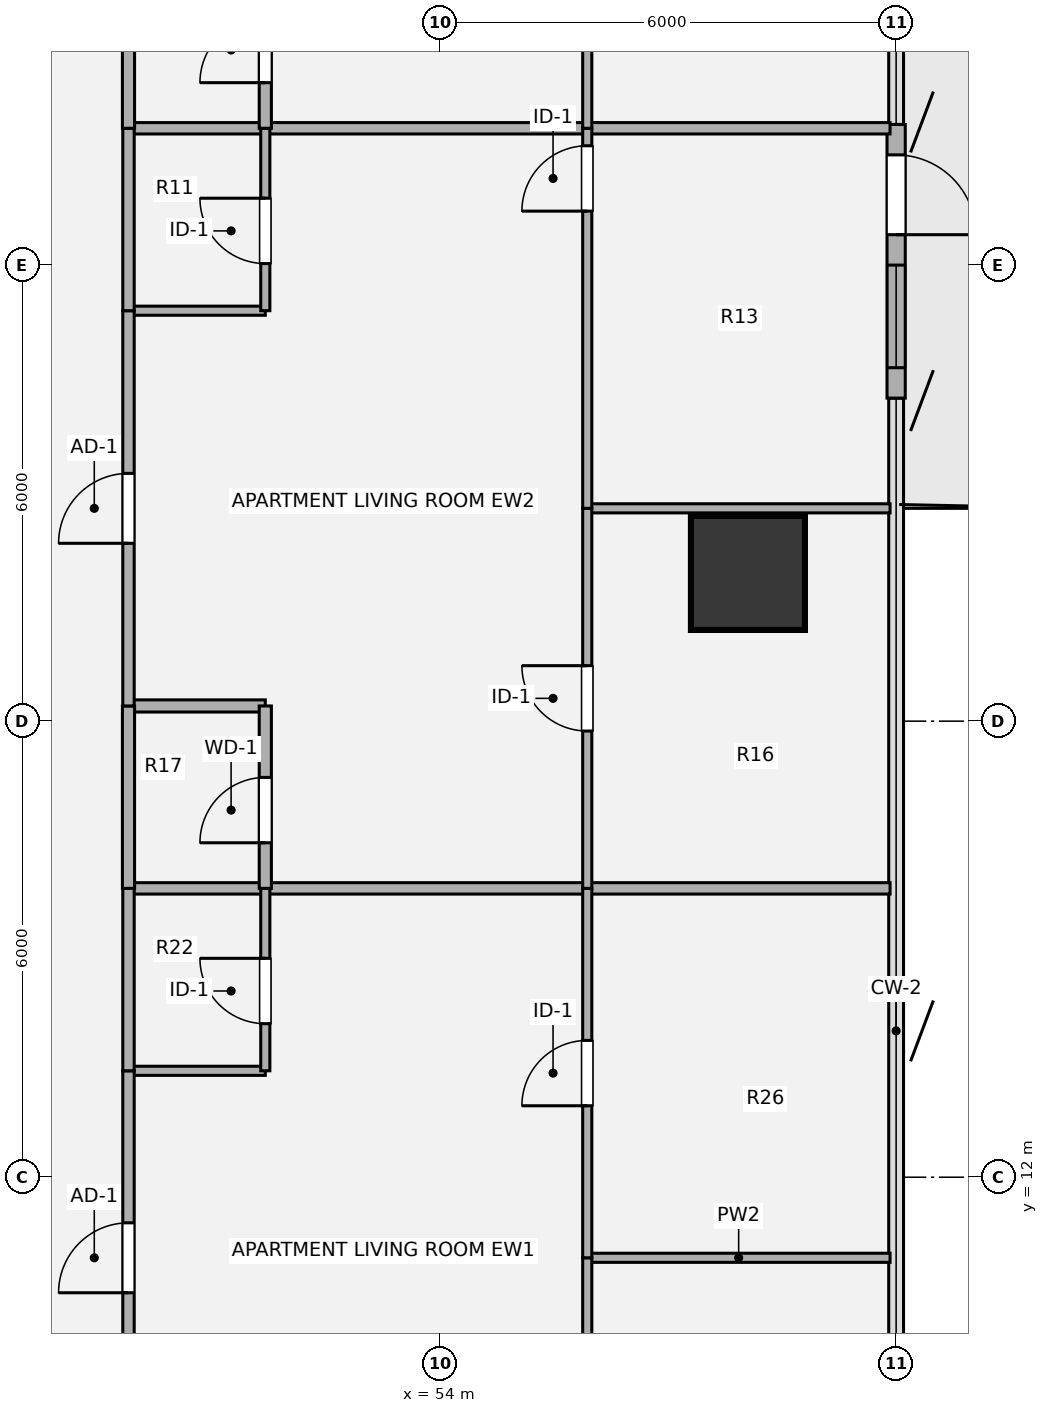
"""IFC4 building model, lengths in metres.
Left out: names, types, materials, properties, quantities, classifications, styles, units other than length and angle.
Written with IfcOpenShell. Run it as: python <this file> out.ifc"""

import sys

from ifc_helpers import new_model, si_unit, direction, frame, frame_2d, origin, origin_2d, place, context, subcontext, project, spatial, rectangle, hollow_circle, extrude, source, transform, mapped, element, fill, save


model = new_model("IFC4")
c1 = context("Model", 3, precision=1e-05, world=origin(), true_north=direction((0.0, 1.0)))
c2 = subcontext(c1, "Body", "Model", "MODEL_VIEW")
j1 = project(units=[si_unit("LENGTHUNIT", "METRE"), si_unit("PLANEANGLEUNIT", "RADIAN")], contexts=[c1])
p1 = place(None, origin())
s1 = spatial("IfcSite", under=j1, at=p1, CompositionType="ELEMENT")
p2 = place(p1, origin())
s2 = spatial("IfcBuilding", under=s1, at=p2, CompositionType="ELEMENT")
p3 = place(p2, frame((0.0, 0.0, 76.14)))
s3 = spatial("IfcBuildingStorey", under=s2, at=p3, CompositionType="ELEMENT", Elevation=76.14)
m1 = source(origin(), c2, "Body", "SweptSolid", [
    extrude(hollow_circle(Radius=0.75, WallThickness=0.05, at=origin_2d()), origin(), (0.0, 0.0, 1.0), 3.372),
])
p4 = place(p3, frame((58.05, 19.95, 0.0), z_axis=(0.0, 0.0, 1.0), x_axis=(1.0, 0.0, 0.0)))
e1 = element("IfcColumn", 1, at=p4, inside=s3, PredefinedType="COLUMN", context=c2, shape_type="MappedRepresentation", body=[
    mapped(m1, transform((0.0, 0.0, 0.0), x_axis=(1.0, 0.0, 0.0), y_axis=(0.0, 1.0, 0.0), z_axis=(0.0, 0.0, 1.0), scale=1.0)),
])
p5 = place(p3, frame((60.0, 25.85, 0.0), z_axis=(0.0, 0.0, 1.0), x_axis=(0.0, -1.0, 0.0)))
e2 = element("IfcWall", 2, at=p5, inside=s3, PredefinedType="SOLIDWALL", context=c2, shape_type="SweptSolid", body=[
    extrude(rectangle(XDim=3.6, YDim=0.24, at=frame_2d((1.8, 0.0))), origin(), (0.0, 0.0, 1.0), 3.372),
])
p6 = place(p5, frame((0.4, 0.0, 0.0)))
e3 = element("IfcOpeningElement", 3, at=p6, cuts=e2, PredefinedType="OPENING", context=c2, shape_type="SweptSolid", body=[
    extrude(rectangle(XDim=1.05, YDim=2.15, at=origin_2d()), frame((0.525, 0.13, 1.075), z_axis=(0.0, -1.0, 0.0), x_axis=(1.0, 0.0, 0.0)), (0.0, 0.0, 1.0), 0.26),
])
p7 = place(p5, frame((1.85, 0.0, 0.85)))
e4 = element("IfcOpeningElement", 4, at=p7, cuts=e2, PredefinedType="OPENING", context=c2, shape_type="SweptSolid", body=[
    extrude(rectangle(XDim=1.35, YDim=1.35, at=origin_2d()), frame((0.675, 0.13, 0.675), z_axis=(0.0, -1.0, 0.0), x_axis=(1.0, 0.0, 0.0)), (0.0, 0.0, 1.0), 0.26),
])
p8 = place(p3, frame((55.936, 10.94, 0.0), z_axis=(0.0, 0.0, 1.0), x_axis=(1.0, 0.0, 0.0)))
e5 = element("IfcWall", 5, at=p8, inside=s3, PredefinedType="PARTITIONING", context=c2, shape_type="SweptSolid", body=[
    extrude(rectangle(XDim=3.984, YDim=0.12, at=frame_2d((1.992, 0.0))), origin(), (0.0, 0.0, 1.0), 3.342),
])
p9 = place(p3, frame((49.9, 13.4, 0.0), z_axis=(0.0, 0.0, 1.0), x_axis=(1.0, 0.0, 0.0)))
e6 = element("IfcWall", 6, at=p9, inside=s3, PredefinedType="PARTITIONING", context=c2, shape_type="SweptSolid", body=[
    extrude(rectangle(XDim=1.8, YDim=0.12, at=frame_2d((0.9, 0.0))), origin(), (0.0, 0.0, 1.0), 3.342),
])
p10 = place(p3, frame((49.9, 15.8, 0.0), z_axis=(0.0, 0.0, 1.0), x_axis=(1.0, 0.0, 0.0)))
e7 = element("IfcWall", 7, at=p10, inside=s3, PredefinedType="PARTITIONING", context=c2, shape_type="SweptSolid", body=[
    extrude(rectangle(XDim=10.02, YDim=0.15, at=frame_2d((5.01, 0.0))), origin(), (0.0, 0.0, 1.0), 3.342),
])
p11 = place(p3, frame((49.9, 18.2, 0.0), z_axis=(0.0, 0.0, 1.0), x_axis=(1.0, 0.0, 0.0)))
e8 = element("IfcWall", 8, at=p11, inside=s3, PredefinedType="PLUMBINGWALL", context=c2, shape_type="SweptSolid", body=[
    extrude(rectangle(XDim=1.8, YDim=0.16, at=frame_2d((0.9, 0.0))), origin(), (0.0, 0.0, 1.0), 1.857),
])
p12 = place(p3, frame((55.936, 20.8, 0.0), z_axis=(0.0, 0.0, 1.0), x_axis=(1.0, 0.0, 0.0)))
e9 = element("IfcWall", 9, at=p12, inside=s3, PredefinedType="PARTITIONING", context=c2, shape_type="SweptSolid", body=[
    extrude(rectangle(XDim=3.984, YDim=0.12, at=frame_2d((1.992, 0.0))), origin(), (0.0, 0.0, 1.0), 3.342),
])
p13 = place(p3, frame((49.9, 23.4, 0.0), z_axis=(0.0, 0.0, 1.0), x_axis=(1.0, 0.0, 0.0)))
e10 = element("IfcWall", 10, at=p13, inside=s3, PredefinedType="PARTITIONING", context=c2, shape_type="SweptSolid", body=[
    extrude(rectangle(XDim=1.8, YDim=0.12, at=frame_2d((0.9, 0.0))), origin(), (0.0, 0.0, 1.0), 2.824),
])
p14 = place(p3, frame((49.9, 25.8, 0.0), z_axis=(0.0, 0.0, 1.0), x_axis=(1.0, 0.0, 0.0)))
e11 = element("IfcWall", 11, at=p14, inside=s3, PredefinedType="PARTITIONING", context=c2, shape_type="SweptSolid", body=[
    extrude(rectangle(XDim=10.02, YDim=0.15, at=frame_2d((5.01, 0.0))), origin(), (0.0, 0.0, 1.0), 2.824),
])
p15 = place(p3, frame((49.9, 8.48, 0.0), z_axis=(0.0, 0.0, 1.0), x_axis=(0.0, 1.0, 0.0)))
e12 = element("IfcWall", 12, at=p15, inside=s3, PredefinedType="PARTITIONING", context=c2, shape_type="SweptSolid", body=[
    extrude(rectangle(XDim=4.92, YDim=0.15, at=frame_2d((2.46, 0.0))), origin(), (0.0, 0.0, 1.0), 3.342),
])
p16 = place(p15, frame((2.0, 0.0, 0.0)))
e13 = element("IfcOpeningElement", 13, at=p16, cuts=e12, PredefinedType="OPENING", context=c2, shape_type="SweptSolid", body=[
    extrude(rectangle(XDim=0.92, YDim=2.1, at=origin_2d()), frame((0.46, 0.085, 1.05), z_axis=(0.0, -1.0, 0.0), x_axis=(1.0, 0.0, 0.0)), (0.0, 0.0, 1.0), 0.17),
])
p17 = place(p3, frame((49.9, 13.4, 0.0), z_axis=(0.0, 0.0, 1.0), x_axis=(0.0, 1.0, 0.0)))
e14 = element("IfcWall", 14, at=p17, inside=s3, PredefinedType="PARTITIONING", context=c2, shape_type="SweptSolid", body=[
    extrude(rectangle(XDim=2.4, YDim=0.15, at=frame_2d((1.2, 0.0))), origin(), (0.0, 0.0, 1.0), 3.342),
])
p18 = place(p3, frame((49.9, 15.8, 0.0), z_axis=(0.0, 0.0, 1.0), x_axis=(0.0, 1.0, 0.0)))
e15 = element("IfcWall", 15, at=p18, inside=s3, PredefinedType="PLUMBINGWALL", context=c2, shape_type="SweptSolid", body=[
    extrude(rectangle(XDim=2.4, YDim=0.16, at=frame_2d((1.2, 0.0))), origin(), (0.0, 0.0, 1.0), 3.342),
])
p19 = place(p3, frame((49.9, 18.2, 0.0), z_axis=(0.0, 0.0, 1.0), x_axis=(0.0, 1.0, 0.0)))
e16 = element("IfcWall", 16, at=p19, inside=s3, PredefinedType="PARTITIONING", context=c2, shape_type="SweptSolid", body=[
    extrude(rectangle(XDim=5.2, YDim=0.15, at=frame_2d((2.6, 0.0))), origin(), (0.0, 0.0, 1.0), 3.342),
])
p20 = place(p19, frame((2.14, 0.0, 0.0)))
e17 = element("IfcOpeningElement", 17, at=p20, cuts=e16, PredefinedType="OPENING", context=c2, shape_type="SweptSolid", body=[
    extrude(rectangle(XDim=0.92, YDim=2.1, at=origin_2d()), frame((0.46, 0.085, 1.05), z_axis=(0.0, -1.0, 0.0), x_axis=(1.0, 0.0, 0.0)), (0.0, 0.0, 1.0), 0.17),
])
p21 = place(p3, frame((49.9, 23.4, 0.0), z_axis=(0.0, 0.0, 1.0), x_axis=(0.0, 1.0, 0.0)))
e18 = element("IfcWall", 18, at=p21, inside=s3, PredefinedType="PARTITIONING", context=c2, shape_type="SweptSolid", body=[
    extrude(rectangle(XDim=2.4, YDim=0.15, at=frame_2d((1.2, 0.0))), origin(), (0.0, 0.0, 1.0), 3.342),
])
p22 = place(p3, frame((49.9, 25.8, 0.0), z_axis=(0.0, 0.0, 1.0), x_axis=(0.0, 1.0, 0.0)))
e19 = element("IfcWall", 19, at=p22, inside=s3, PredefinedType="PLUMBINGWALL", context=c2, shape_type="SweptSolid", body=[
    extrude(rectangle(XDim=2.4, YDim=0.16, at=frame_2d((1.2, 0.0))), origin(), (0.0, 0.0, 1.0), 3.342),
])
p23 = place(p3, frame((51.7, 13.4, 0.0), z_axis=(0.0, 0.0, 1.0), x_axis=(0.0, 1.0, 0.0)))
e20 = element("IfcWall", 20, at=p23, inside=s3, PredefinedType="PARTITIONING", context=c2, shape_type="SweptSolid", body=[
    extrude(rectangle(XDim=2.4, YDim=0.12, at=frame_2d((1.2, 0.0))), origin(), (0.0, 0.0, 1.0), 3.342),
])
p24 = place(p23, frame((0.62, 0.0, 0.0)))
e21 = element("IfcOpeningElement", 21, at=p24, cuts=e20, PredefinedType="OPENING", context=c2, shape_type="SweptSolid", body=[
    extrude(rectangle(XDim=0.86, YDim=2.1, at=origin_2d()), frame((0.43, 0.07, 1.05), z_axis=(0.0, -1.0, 0.0), x_axis=(1.0, 0.0, 0.0)), (0.0, 0.0, 1.0), 0.14),
])
p25 = place(p3, frame((51.7, 15.8, 0.0), z_axis=(0.0, 0.0, 1.0), x_axis=(0.0, 1.0, 0.0)))
e22 = element("IfcWall", 22, at=p25, inside=s3, PredefinedType="PLUMBINGWALL", context=c2, shape_type="SweptSolid", body=[
    extrude(rectangle(XDim=2.4, YDim=0.16, at=frame_2d((1.2, 0.0))), origin(), (0.0, 0.0, 1.0), 3.342),
])
p26 = place(p25, frame((0.6, 0.0, 0.0)))
e23 = element("IfcOpeningElement", 23, at=p26, cuts=e22, PredefinedType="OPENING", context=c2, shape_type="SweptSolid", body=[
    extrude(rectangle(XDim=0.86, YDim=2.1, at=origin_2d()), frame((0.43, 0.09, 1.05), z_axis=(0.0, -1.0, 0.0), x_axis=(1.0, 0.0, 0.0)), (0.0, 0.0, 1.0), 0.18),
])
p27 = place(p3, frame((51.7, 23.4, 0.0), z_axis=(0.0, 0.0, 1.0), x_axis=(0.0, 1.0, 0.0)))
e24 = element("IfcWall", 24, at=p27, inside=s3, PredefinedType="PARTITIONING", context=c2, shape_type="SweptSolid", body=[
    extrude(rectangle(XDim=2.4, YDim=0.12, at=frame_2d((1.2, 0.0))), origin(), (0.0, 0.0, 1.0), 3.342),
])
p28 = place(p27, frame((0.62, 0.0, 0.0)))
e25 = element("IfcOpeningElement", 25, at=p28, cuts=e24, PredefinedType="OPENING", context=c2, shape_type="SweptSolid", body=[
    extrude(rectangle(XDim=0.86, YDim=2.1, at=origin_2d()), frame((0.43, 0.07, 1.05), z_axis=(0.0, -1.0, 0.0), x_axis=(1.0, 0.0, 0.0)), (0.0, 0.0, 1.0), 0.14),
])
p29 = place(p3, frame((51.7, 25.8, 0.0), z_axis=(0.0, 0.0, 1.0), x_axis=(0.0, 1.0, 0.0)))
e26 = element("IfcWall", 26, at=p29, inside=s3, PredefinedType="PLUMBINGWALL", context=c2, shape_type="SweptSolid", body=[
    extrude(rectangle(XDim=2.4, YDim=0.16, at=frame_2d((1.2, 0.0))), origin(), (0.0, 0.0, 1.0), 3.342),
])
p30 = place(p29, frame((0.6, 0.0, 0.0)))
e27 = element("IfcOpeningElement", 27, at=p30, cuts=e26, PredefinedType="OPENING", context=c2, shape_type="SweptSolid", body=[
    extrude(rectangle(XDim=0.86, YDim=2.1, at=origin_2d()), frame((0.43, 0.09, 1.05), z_axis=(0.0, -1.0, 0.0), x_axis=(1.0, 0.0, 0.0)), (0.0, 0.0, 1.0), 0.18),
])
p31 = place(p3, frame((55.936, 6.08, 0.0), z_axis=(0.0, 0.0, 1.0), x_axis=(0.0, 1.0, 0.0)))
e28 = element("IfcWall", 28, at=p31, inside=s3, PredefinedType="PARTITIONING", context=c2, shape_type="SweptSolid", body=[
    extrude(rectangle(XDim=4.86, YDim=0.12, at=frame_2d((2.43, 0.0))), origin(), (0.0, 0.0, 1.0), 3.342),
])
p32 = place(p31, frame((2.0, 0.0, 0.0)))
e29 = element("IfcOpeningElement", 29, at=p32, cuts=e28, PredefinedType="OPENING", context=c2, shape_type="SweptSolid", body=[
    extrude(rectangle(XDim=0.86, YDim=2.1, at=origin_2d()), frame((0.43, 0.07, 1.05), z_axis=(0.0, -1.0, 0.0), x_axis=(1.0, 0.0, 0.0)), (0.0, 0.0, 1.0), 0.14),
])
p33 = place(p3, frame((55.936, 10.94, 0.0), z_axis=(0.0, 0.0, 1.0), x_axis=(0.0, 1.0, 0.0)))
e30 = element("IfcWall", 30, at=p33, inside=s3, PredefinedType="PARTITIONING", context=c2, shape_type="SweptSolid", body=[
    extrude(rectangle(XDim=4.86, YDim=0.12, at=frame_2d((2.43, 0.0))), origin(), (0.0, 0.0, 1.0), 3.342),
])
p34 = place(p33, frame((2.0, 0.0, 0.0)))
e31 = element("IfcOpeningElement", 31, at=p34, cuts=e30, PredefinedType="OPENING", context=c2, shape_type="SweptSolid", body=[
    extrude(rectangle(XDim=0.86, YDim=2.1, at=origin_2d()), frame((0.43, 0.07, 1.05), z_axis=(0.0, -1.0, 0.0), x_axis=(1.0, 0.0, 0.0)), (0.0, 0.0, 1.0), 0.14),
])
p35 = place(p3, frame((55.936, 15.8, 0.0), z_axis=(0.0, 0.0, 1.0), x_axis=(0.0, 1.0, 0.0)))
e32 = element("IfcWall", 32, at=p35, inside=s3, PredefinedType="PARTITIONING", context=c2, shape_type="SweptSolid", body=[
    extrude(rectangle(XDim=5.0, YDim=0.12, at=frame_2d((2.5, 0.0))), origin(), (0.0, 0.0, 1.0), 3.342),
])
p36 = place(p35, frame((2.07, 0.0, 0.0)))
e33 = element("IfcOpeningElement", 33, at=p36, cuts=e32, PredefinedType="OPENING", context=c2, shape_type="SweptSolid", body=[
    extrude(rectangle(XDim=0.86, YDim=2.1, at=origin_2d()), frame((0.43, 0.07, 1.05), z_axis=(0.0, -1.0, 0.0), x_axis=(1.0, 0.0, 0.0)), (0.0, 0.0, 1.0), 0.14),
])
p37 = place(p3, frame((55.936, 20.8, 0.0), z_axis=(0.0, 0.0, 1.0), x_axis=(0.0, 1.0, 0.0)))
e34 = element("IfcWall", 34, at=p37, inside=s3, PredefinedType="PARTITIONING", context=c2, shape_type="SweptSolid", body=[
    extrude(rectangle(XDim=5.0, YDim=0.12, at=frame_2d((2.5, 0.0))), origin(), (0.0, 0.0, 1.0), 3.342),
])
p38 = place(p37, frame((3.91, 0.0, 0.0)))
e35 = element("IfcOpeningElement", 35, at=p38, cuts=e34, PredefinedType="OPENING", context=c2, shape_type="SweptSolid", body=[
    extrude(rectangle(XDim=0.86, YDim=2.1, at=origin_2d()), frame((0.43, 0.07, 1.05), z_axis=(0.0, -1.0, 0.0), x_axis=(1.0, 0.0, 0.0)), (0.0, 0.0, 1.0), 0.14),
])
p39 = place(p3, frame((55.936, 25.8, 0.0), z_axis=(0.0, 0.0, 1.0), x_axis=(0.0, 1.0, 0.0)))
e36 = element("IfcWall", 36, at=p39, inside=s3, PredefinedType="PARTITIONING", context=c2, shape_type="SweptSolid", body=[
    extrude(rectangle(XDim=4.86, YDim=0.12, at=frame_2d((2.43, 0.0))), origin(), (0.0, 0.0, 1.0), 3.342),
])
p40 = place(p39, frame((2.0, 0.0, 0.0)))
e37 = element("IfcOpeningElement", 37, at=p40, cuts=e36, PredefinedType="OPENING", context=c2, shape_type="SweptSolid", body=[
    extrude(rectangle(XDim=0.86, YDim=2.1, at=origin_2d()), frame((0.43, 0.07, 1.05), z_axis=(0.0, -1.0, 0.0), x_axis=(1.0, 0.0, 0.0)), (0.0, 0.0, 1.0), 0.14),
])
m2 = source(origin(), c2, "Body", "SweptSolid", [
    extrude(rectangle(XDim=1.05, YDim=2.15, at=origin_2d()), frame((0.525, 0.025, 1.075), z_axis=(0.0, -1.0, 0.0), x_axis=(1.0, 0.0, 0.0)), (0.0, 0.0, 1.0), 0.05),
])
p41 = place(p6, origin())
e38 = element("IfcDoor", 38, at=p41, inside=s3, OperationType="SINGLE_SWING_RIGHT", PredefinedType="DOOR", context=c2, shape_type="MappedRepresentation", body=[
    mapped(m2, transform((0.0, 0.0, 0.0), x_axis=(1.0, 0.0, 0.0), y_axis=(0.0, 1.0, 0.0), z_axis=(0.0, 0.0, 1.0), scale=1.0)),
])
fill(e3, e38)
m3 = source(origin(), c2, "Body", "SweptSolid", [
    extrude(rectangle(XDim=1.35, YDim=1.35, at=origin_2d()), frame((0.675, 0.03, 0.675), z_axis=(0.0, -1.0, 0.0), x_axis=(1.0, 0.0, 0.0)), (0.0, 0.0, 1.0), 0.06),
])
p42 = place(p7, origin())
e39 = element("IfcWindow", 39, at=p42, inside=s3, PartitioningType="SINGLE_PANEL", PredefinedType="WINDOW", context=c2, shape_type="MappedRepresentation", body=[
    mapped(m3, transform((0.0, 0.0, 0.0), x_axis=(1.0, 0.0, 0.0), y_axis=(0.0, 1.0, 0.0), z_axis=(0.0, 0.0, 1.0), scale=1.0)),
])
fill(e4, e39)
m4 = source(origin(), c2, "Body", "SweptSolid", [
    extrude(rectangle(XDim=0.92, YDim=2.1, at=origin_2d()), frame((0.46, 0.025, 1.05), z_axis=(0.0, -1.0, 0.0), x_axis=(1.0, 0.0, 0.0)), (0.0, 0.0, 1.0), 0.05),
])
p43 = place(p16, origin())
e40 = element("IfcDoor", 40, at=p43, inside=s3, OperationType="SINGLE_SWING_LEFT", PredefinedType="DOOR", context=c2, shape_type="MappedRepresentation", body=[
    mapped(m4, transform((0.0, 0.0, 0.0), x_axis=(1.0, 0.0, 0.0), y_axis=(0.0, 1.0, 0.0), z_axis=(0.0, 0.0, 1.0), scale=1.0)),
])
fill(e13, e40)
p44 = place(p20, origin())
e41 = element("IfcDoor", 41, at=p44, inside=s3, OperationType="SINGLE_SWING_LEFT", PredefinedType="DOOR", context=c2, shape_type="MappedRepresentation", body=[
    mapped(m4, transform((0.0, 0.0, 0.0), x_axis=(1.0, 0.0, 0.0), y_axis=(0.0, 1.0, 0.0), z_axis=(0.0, 0.0, 1.0), scale=1.0)),
])
fill(e17, e41)
m5 = source(origin(), c2, "Body", "SweptSolid", [
    extrude(rectangle(XDim=0.86, YDim=2.1, at=origin_2d()), frame((0.43, 0.025, 1.05), z_axis=(0.0, -1.0, 0.0), x_axis=(1.0, 0.0, 0.0)), (0.0, 0.0, 1.0), 0.05),
])
p45 = place(p24, origin())
e42 = element("IfcDoor", 42, at=p45, inside=s3, OperationType="SINGLE_SWING_RIGHT", PredefinedType="DOOR", context=c2, shape_type="MappedRepresentation", body=[
    mapped(m5, transform((0.0, 0.0, 0.0), x_axis=(1.0, 0.0, 0.0), y_axis=(0.0, 1.0, 0.0), z_axis=(0.0, 0.0, 1.0), scale=1.0)),
])
fill(e21, e42)
m6 = source(origin(), c2, "Body", "SweptSolid", [
    extrude(rectangle(XDim=0.86, YDim=2.1, at=origin_2d()), frame((0.43, 0.025, 1.05), z_axis=(0.0, -1.0, 0.0), x_axis=(1.0, 0.0, 0.0)), (0.0, 0.0, 1.0), 0.05),
])
p46 = place(p26, origin())
e43 = element("IfcDoor", 43, at=p46, inside=s3, OperationType="SINGLE_SWING_LEFT", PredefinedType="DOOR", context=c2, shape_type="MappedRepresentation", body=[
    mapped(m6, transform((0.0, 0.0, 0.0), x_axis=(1.0, 0.0, 0.0), y_axis=(0.0, 1.0, 0.0), z_axis=(0.0, 0.0, 1.0), scale=1.0)),
])
fill(e23, e43)
p47 = place(p28, origin())
e44 = element("IfcDoor", 44, at=p47, inside=s3, OperationType="SINGLE_SWING_RIGHT", PredefinedType="DOOR", context=c2, shape_type="MappedRepresentation", body=[
    mapped(m5, transform((0.0, 0.0, 0.0), x_axis=(1.0, 0.0, 0.0), y_axis=(0.0, 1.0, 0.0), z_axis=(0.0, 0.0, 1.0), scale=1.0)),
])
fill(e25, e44)
p48 = place(p30, origin())
e45 = element("IfcDoor", 45, at=p48, inside=s3, OperationType="SINGLE_SWING_LEFT", PredefinedType="DOOR", context=c2, shape_type="MappedRepresentation", body=[
    mapped(m6, transform((0.0, 0.0, 0.0), x_axis=(1.0, 0.0, 0.0), y_axis=(0.0, 1.0, 0.0), z_axis=(0.0, 0.0, 1.0), scale=1.0)),
])
fill(e27, e45)
p49 = place(p34, origin())
e46 = element("IfcDoor", 46, at=p49, inside=s3, OperationType="SINGLE_SWING_LEFT", PredefinedType="DOOR", context=c2, shape_type="MappedRepresentation", body=[
    mapped(m5, transform((0.0, 0.0, 0.0), x_axis=(1.0, 0.0, 0.0), y_axis=(0.0, 1.0, 0.0), z_axis=(0.0, 0.0, 1.0), scale=1.0)),
])
fill(e31, e46)
p50 = place(p36, origin())
e47 = element("IfcDoor", 47, at=p50, inside=s3, OperationType="SINGLE_SWING_RIGHT", PredefinedType="DOOR", context=c2, shape_type="MappedRepresentation", body=[
    mapped(m5, transform((0.0, 0.0, 0.0), x_axis=(1.0, 0.0, 0.0), y_axis=(0.0, 1.0, 0.0), z_axis=(0.0, 0.0, 1.0), scale=1.0)),
])
fill(e33, e47)
p51 = place(p38, origin())
e48 = element("IfcDoor", 48, at=p51, inside=s3, OperationType="SINGLE_SWING_LEFT", PredefinedType="DOOR", context=c2, shape_type="MappedRepresentation", body=[
    mapped(m5, transform((0.0, 0.0, 0.0), x_axis=(1.0, 0.0, 0.0), y_axis=(0.0, 1.0, 0.0), z_axis=(0.0, 0.0, 1.0), scale=1.0)),
])
fill(e35, e48)
save(model, sys.argv[1])
